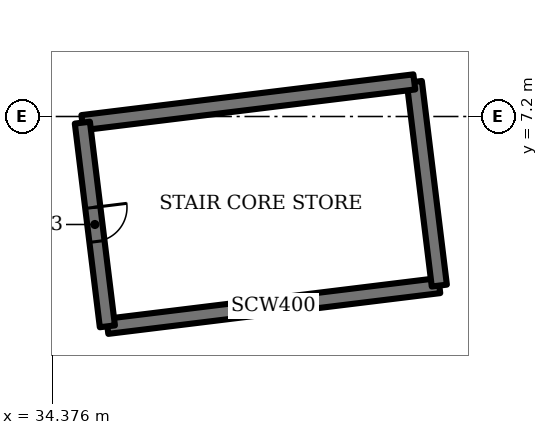
"""IFC4 building model, lengths in metres.
Left out: names, types, materials, properties, quantities, classifications, styles, units other than length and angle.
Written with IfcOpenShell. Run it as: python <this file> out.ifc"""

import sys

from ifc_helpers import new_model, si_unit, direction, frame, frame_2d, origin, place, context, subcontext, project, spatial, rectangle, extrude, element, fill, save


model = new_model("IFC4")
c1 = context("Model", 3, precision=1e-05, world=origin(), true_north=direction((0.0, 1.0)))
c2 = subcontext(c1, "Body", "Model", "MODEL_VIEW")
j1 = project(units=[si_unit("LENGTHUNIT", "METRE"), si_unit("PLANEANGLEUNIT", "RADIAN")], contexts=[c1])
p1 = place(None, origin())
s1 = spatial("IfcSite", under=j1, at=p1, CompositionType="ELEMENT")
p2 = place(p1, origin())
s2 = spatial("IfcBuilding", under=s1, at=p2, CompositionType="ELEMENT")
p3 = place(p2, frame((0.0, 0.0, -5.5)))
s3 = spatial("IfcBuildingStorey", under=s2, at=p3, CompositionType="ELEMENT", Elevation=-5.5)
p4 = place(p3, frame((35.823, 1.678, 0.0), z_axis=(0.0, 0.0, 1.0), x_axis=(0.992545280606, 0.121876437212, 0.0)))
e1 = element("IfcWall", 1, at=p4, inside=s3, PredefinedType="SHEAR", context=c2, shape_type="SweptSolid", body=[
    extrude(rectangle(XDim=8.8, YDim=0.4, at=frame_2d((4.4, 0.0))), origin(), (0.0, 0.0, 1.0), 5.5),
])
p5 = place(p3, frame((44.557, 2.751, 0.0), z_axis=(0.0, 0.0, 1.0), x_axis=(-0.12184754212, 0.99254882826, 0.0)))
e2 = element("IfcWall", 2, at=p5, inside=s3, PredefinedType="SHEAR", context=c2, shape_type="SweptSolid", body=[
    extrude(rectangle(XDim=5.4, YDim=0.4, at=frame_2d((2.7, 0.0))), origin(), (0.0, 0.0, 1.0), 5.5),
])
p6 = place(p3, frame((43.899, 8.11, 0.0), z_axis=(0.0, 0.0, 1.0), x_axis=(-0.992545280606, -0.121876437212, 0.0)))
e3 = element("IfcWall", 3, at=p6, inside=s3, PredefinedType="SHEAR", context=c2, shape_type="SweptSolid", body=[
    extrude(rectangle(XDim=8.8, YDim=0.4, at=frame_2d((4.4, 0.0))), origin(), (0.0, 0.0, 1.0), 5.5),
])
p7 = place(p3, frame((35.165, 7.038, 0.0), z_axis=(0.0, 0.0, 1.0), x_axis=(0.12184754212, -0.99254882826, 0.0)))
e4 = element("IfcWall", 4, at=p7, inside=s3, PredefinedType="SHEAR", context=c2, shape_type="SweptSolid", body=[
    extrude(rectangle(XDim=5.4, YDim=0.4, at=frame_2d((2.7, 0.0))), origin(), (0.0, 0.0, 1.0), 5.5),
])
p8 = place(p7, frame((2.25, 0.0, 0.0)))
e5 = element("IfcOpeningElement", 5, at=p8, cuts=e4, PredefinedType="OPENING", context=c2, shape_type="SweptSolid", body=[
    extrude(rectangle(XDim=0.9, YDim=2.1, at=frame_2d((0.45, 1.05))), frame((0.0, 0.21, 0.0), z_axis=(0.0, -1.0, 0.0), x_axis=(1.0, 0.0, 0.0)), (0.0, 0.0, 1.0), 0.42),
])
p9 = place(p8, origin())
e6 = element("IfcDoor", 6, at=p9, inside=s3, OperationType="SINGLE_SWING_LEFT", PredefinedType="DOOR", context=c2, shape_type="SweptSolid", body=[
    extrude(rectangle(XDim=0.9, YDim=2.1, at=frame_2d((0.45, 1.05))), frame((0.0, 0.025, 0.0), z_axis=(0.0, -1.0, 0.0), x_axis=(1.0, 0.0, 0.0)), (0.0, 0.0, 1.0), 0.05),
])
fill(e5, e6)
save(model, sys.argv[1])
